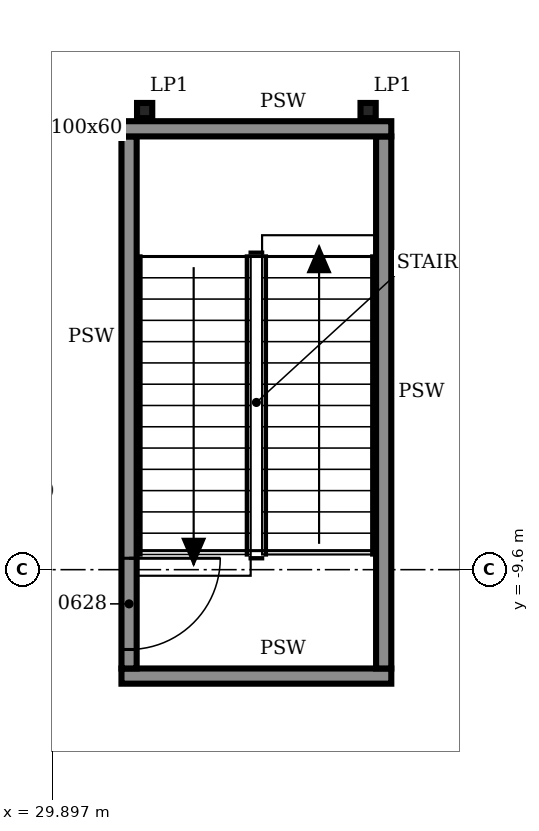
"""IFC4 building model, lengths in metres.
Left out: names, types, materials, properties, quantities, classifications, styles, units other than length and angle.
Written with IfcOpenShell. Run it as: python <this file> out.ifc"""

import sys

from ifc_helpers import new_model, si_unit, direction, frame, frame_2d, origin, origin_2d, place, context, subcontext, project, spatial, rectangle, i_section, extrude, element, fill, save


model = new_model("IFC4")
c1 = context("Model", 3, precision=1e-05, world=origin(), true_north=direction((0.0, 1.0)))
c2 = subcontext(c1, "Body", "Model", "MODEL_VIEW")
j1 = project(units=[si_unit("LENGTHUNIT", "METRE"), si_unit("PLANEANGLEUNIT", "RADIAN")], contexts=[c1])
p1 = place(None, origin())
s1 = spatial("IfcSite", under=j1, at=p1, CompositionType="ELEMENT")
p2 = place(p1, origin())
s2 = spatial("IfcBuilding", under=s1, at=p2, CompositionType="ELEMENT")
p3 = place(p2, frame((0.0, 0.0, 35.4)))
s3 = spatial("IfcBuildingStorey", under=s2, at=p3, CompositionType="ELEMENT", Elevation=35.4)
for number, where, z_axis, x_axis in (
    (1, (31.105, -3.56, 0.0), (0.0, 0.0, 1.0), (1.0, 0.0, 0.0)),
    (2, (34.045, -3.56, 0.0), (0.0, 0.0, 1.0), (1.0, 0.0, 0.0)),
):
    element("IfcColumn", number, at=place(p3, frame(where, z_axis=z_axis, x_axis=x_axis)), inside=s3, PredefinedType="COLUMN", context=c2, shape_type="SweptSolid", body=[
        extrude(i_section(OverallWidth=0.2, OverallDepth=0.2, WebThickness=0.009, FlangeThickness=0.015, FilletRadius=0.018, at=origin_2d()), origin(), (0.0, 0.0, 1.0), 2.2),
    ])
p4 = place(p3, frame((30.8, -11.0, 0.0), z_axis=(0.0, 0.0, 1.0), x_axis=(1.0, 0.0, 0.0)))
e3 = element("IfcWall", 3, at=p4, inside=s3, PredefinedType="SOLIDWALL", context=c2, shape_type="SweptSolid", body=[
    extrude(rectangle(XDim=3.55, YDim=0.2, at=frame_2d((1.775, 0.0))), origin(), (0.0, 0.0, 1.0), 4.65),
])
p5 = place(p3, frame((30.9, -10.9, 0.0), z_axis=(0.0, 0.0, 1.0), x_axis=(0.0, 1.0, 0.0)))
e4 = element("IfcWall", 4, at=p5, inside=s3, PredefinedType="SOLIDWALL", context=c2, shape_type="SweptSolid", body=[
    extrude(rectangle(XDim=7.0, YDim=0.2, at=frame_2d((3.5, 0.0))), origin(), (0.0, 0.0, 1.0), 4.65),
])
p6 = place(p5, frame((0.25, 0.0, 0.0)))
e5 = element("IfcOpeningElement", 5, at=p6, cuts=e4, PredefinedType="OPENING", context=c2, shape_type="SweptSolid", body=[
    extrude(rectangle(XDim=1.2, YDim=2.1, at=frame_2d((0.6, 1.05))), frame((0.0, 0.11, 0.0), z_axis=(0.0, -1.0, 0.0), x_axis=(1.0, 0.0, 0.0)), (0.0, 0.0, 1.0), 0.22),
])
p7 = place(p3, frame((34.25, -10.9, 0.0), z_axis=(0.0, 0.0, 1.0), x_axis=(0.0, 1.0, 0.0)))
e6 = element("IfcWall", 6, at=p7, inside=s3, PredefinedType="SOLIDWALL", context=c2, shape_type="SweptSolid", body=[
    extrude(rectangle(XDim=7.0, YDim=0.2, at=frame_2d((3.5, 0.0))), origin(), (0.0, 0.0, 1.0), 4.65),
])
p8 = place(p3, frame((30.8, -3.8, 0.0), z_axis=(0.0, 0.0, 1.0), x_axis=(1.0, 0.0, 0.0)))
e7 = element("IfcWall", 7, at=p8, inside=s3, PredefinedType="SOLIDWALL", context=c2, shape_type="SweptSolid", body=[
    extrude(rectangle(XDim=3.55, YDim=0.2, at=frame_2d((1.775, 0.0))), origin(), (0.0, 0.0, 1.0), 4.65),
])
p9 = place(p6, frame((1.2, 0.0, 0.0), z_axis=(0.0, 0.0, 1.0), x_axis=(-1.0, 0.0, 0.0)))
e8 = element("IfcDoor", 8, at=p9, inside=s3, OperationType="SINGLE_SWING_LEFT", PredefinedType="DOOR", context=c2, shape_type="SweptSolid", body=[
    extrude(rectangle(XDim=1.2, YDim=2.1, at=frame_2d((0.6, 1.05))), frame((0.0, 0.025, 0.0), z_axis=(0.0, -1.0, 0.0), x_axis=(1.0, 0.0, 0.0)), (0.0, 0.0, 1.0), 0.05),
])
fill(e5, e8)
save(model, sys.argv[1])
